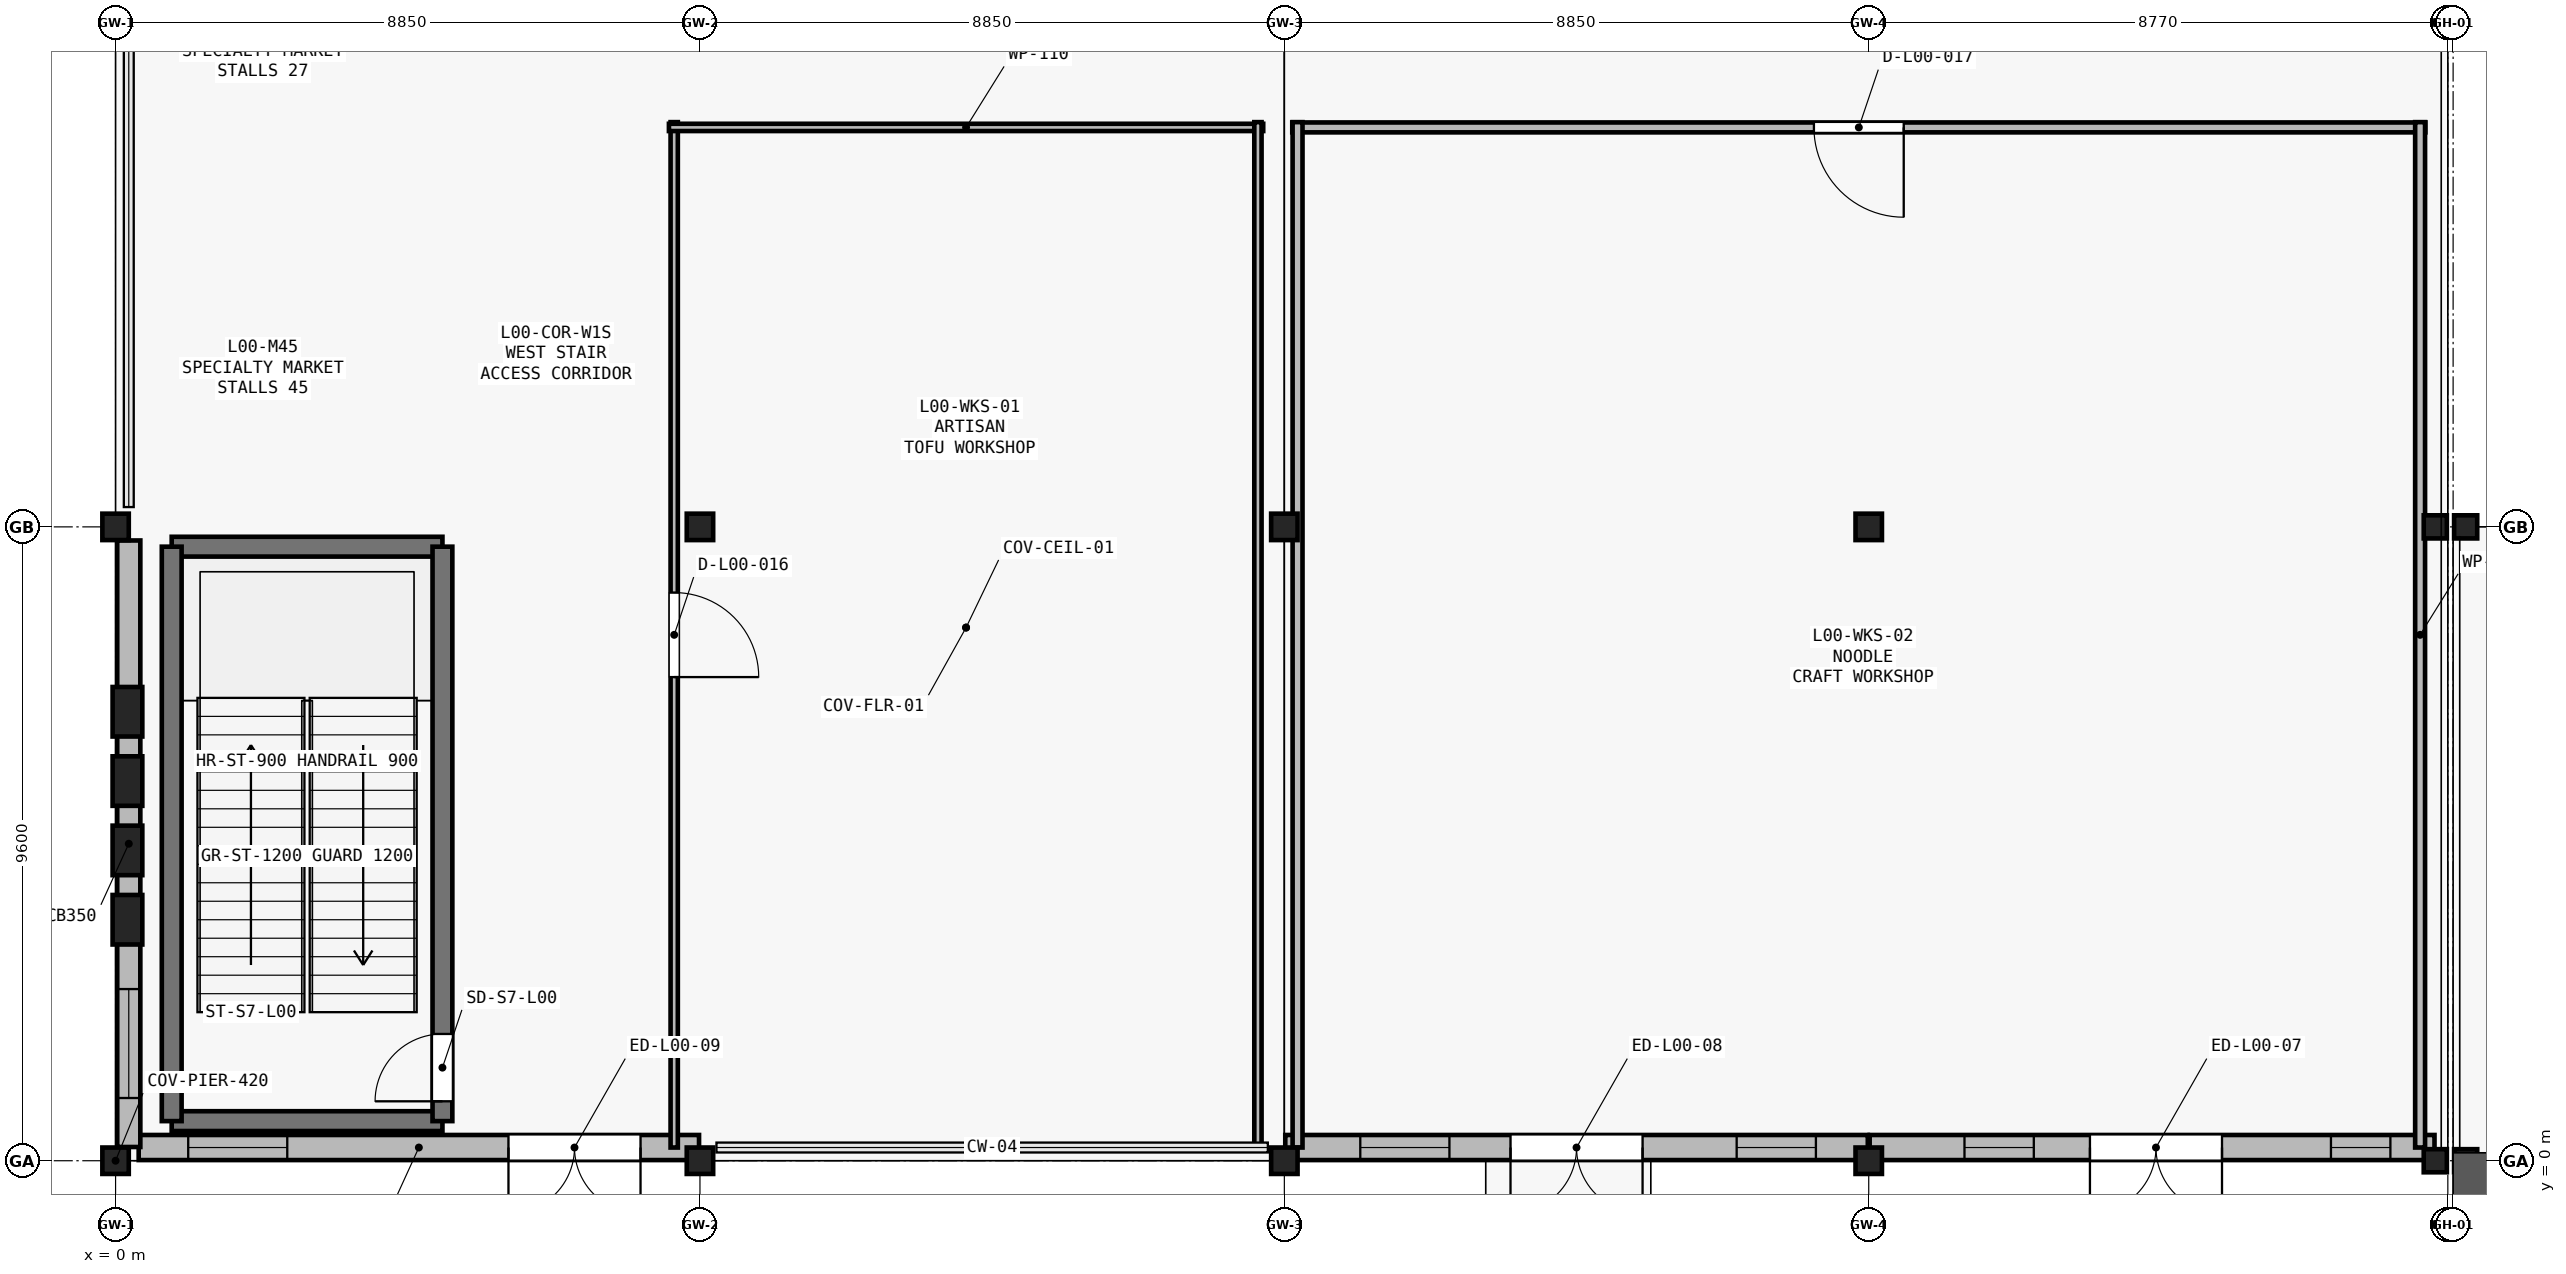
"""IFC4 building model, lengths in metres.
Left out: names, types, materials, properties, quantities, classifications, styles, units other than length and angle.
Written with IfcOpenShell. Run it as: python <this file> out.ifc"""

import sys

from ifc_helpers import new_model, si_unit, direction, frame, frame_2d, origin, origin_2d, place, context, subcontext, project, spatial, rectangle, i_section, extrude, element, fill, save


model = new_model("IFC4")
c1 = context("Model", 3, precision=1e-05, world=origin(), true_north=direction((0.0, 1.0)))
c2 = subcontext(c1, "Body", "Model", "MODEL_VIEW")
j1 = project(units=[si_unit("LENGTHUNIT", "METRE"), si_unit("PLANEANGLEUNIT", "RADIAN")], contexts=[c1])
p1 = place(None, origin())
s1 = spatial("IfcSite", under=j1, at=p1, CompositionType="ELEMENT")
p2 = place(p1, origin())
s2 = spatial("IfcBuilding", under=s1, at=p2, CompositionType="ELEMENT")
p3 = place(p2, origin())
s3 = spatial("IfcBuildingStorey", under=s2, at=p3, CompositionType="ELEMENT", Elevation=0.0)
for number, where, z_axis, x_axis in (
    (1, (0.0, 0.0, 0.0), (0.0, 0.0, 1.0), (1.0, 0.0, 0.0)),
    (2, (0.0, 9.6, 0.0), (0.0, 0.0, 1.0), (1.0, 0.0, 0.0)),
    (3, (8.85, 0.0, 0.0), (0.0, 0.0, 1.0), (1.0, 0.0, 0.0)),
    (4, (8.85, 9.6, 0.0), (0.0, 0.0, 1.0), (1.0, 0.0, 0.0)),
    (5, (17.7, 0.0, 0.0), (0.0, 0.0, 1.0), (1.0, 0.0, 0.0)),
    (6, (17.7, 9.6, 0.0), (0.0, 0.0, 1.0), (1.0, 0.0, 0.0)),
    (7, (26.55, 0.0, 0.0), (0.0, 0.0, 1.0), (1.0, 0.0, 0.0)),
    (8, (26.55, 9.6, 0.0), (0.0, 0.0, 1.0), (1.0, 0.0, 0.0)),
):
    element("IfcColumn", number, at=place(p3, frame(where, z_axis=z_axis, x_axis=x_axis)), inside=s3, PredefinedType="COLUMN", context=c2, shape_type="SweptSolid", body=[
        extrude(i_section(OverallWidth=0.4, OverallDepth=0.4, WebThickness=0.013, FlangeThickness=0.021, FilletRadius=0.022, at=origin_2d()), origin(), (0.0, 0.0, 1.0), 6.0),
    ])
for number, where, z_axis, x_axis in (
    (9, (35.13, 0.0, 0.0), (0.0, 0.0, 1.0), (1.0, 0.0, 0.0)),
    (10, (35.13, 9.6, 0.0), (0.0, 0.0, 1.0), (1.0, 0.0, 0.0)),
    (11, (35.59, 0.0, 0.0), (0.0, 0.0, 1.0), (1.0, 0.0, 0.0)),
    (12, (35.59, 9.6, 0.0), (0.0, 0.0, 1.0), (1.0, 0.0, 0.0)),
):
    element("IfcColumn", number, at=place(p3, frame(where, z_axis=z_axis, x_axis=x_axis)), inside=s3, PredefinedType="COLUMN", context=c2, shape_type="SweptSolid", body=[
        extrude(i_section(OverallWidth=0.35, OverallDepth=0.35, WebThickness=0.012, FlangeThickness=0.019, FilletRadius=0.02, at=origin_2d()), origin(), (0.0, 0.0, 1.0), 6.0),
    ])
for number, where, z_axis, x_axis in (
    (13, (0.18, 3.65, 0.0), (0.0, 0.0, 1.0), (1.0, 0.0, 0.0)),
    (14, (0.18, 4.7, 0.0), (0.0, 0.0, 1.0), (1.0, 0.0, 0.0)),
    (15, (0.18, 5.75, 0.0), (0.0, 0.0, 1.0), (1.0, 0.0, 0.0)),
    (16, (0.18, 6.8, 0.0), (0.0, 0.0, 1.0), (1.0, 0.0, 0.0)),
):
    element("IfcColumn", number, at=place(p3, frame(where, z_axis=z_axis, x_axis=x_axis)), inside=s3, PredefinedType="PILASTER", context=c2, shape_type="SweptSolid", body=[
        extrude(rectangle(XDim=0.45, YDim=0.75, at=origin_2d()), origin(), (0.0, 0.0, 1.0), 5.75),
    ])
p4 = place(p3, frame((35.118, 0.2, 0.0), z_axis=(0.0, 0.0, 1.0), x_axis=(-1.0, 0.0, 0.0)))
e17 = element("IfcWall", 17, at=p4, inside=s3, PredefinedType="SOLIDWALL", context=c2, shape_type="SweptSolid", body=[
    extrude(rectangle(XDim=8.554, YDim=0.38, at=frame_2d((4.277, 0.0))), origin(), (0.0, 0.0, 1.0), 5.12),
])
p5 = place(p4, frame((3.218, 0.0, 0.0)))
e18 = element("IfcOpeningElement", 18, at=p5, cuts=e17, PredefinedType="OPENING", context=c2, shape_type="SweptSolid", body=[
    extrude(rectangle(XDim=2.0, YDim=2.2, at=frame_2d((1.0, 1.1))), frame((0.0, 0.2, 0.0), z_axis=(0.0, -1.0, 0.0), x_axis=(1.0, 0.0, 0.0)), (0.0, 0.0, 1.0), 0.4),
])
p6 = place(p4, frame((0.668, 0.0, 1.0)))
e19 = element("IfcOpeningElement", 19, at=p6, cuts=e17, PredefinedType="OPENING", context=c2, shape_type="SweptSolid", body=[
    extrude(rectangle(XDim=0.9, YDim=1.8, at=frame_2d((0.45, 0.9))), frame((0.0, 0.2, 0.0), z_axis=(0.0, -1.0, 0.0), x_axis=(1.0, 0.0, 0.0)), (0.0, 0.0, 1.0), 0.4),
])
p7 = place(p4, frame((6.068, 0.0, 1.0)))
e20 = element("IfcOpeningElement", 20, at=p7, cuts=e17, PredefinedType="OPENING", context=c2, shape_type="SweptSolid", body=[
    extrude(rectangle(XDim=1.05, YDim=1.8, at=frame_2d((0.525, 0.9))), frame((0.0, 0.2, 0.0), z_axis=(0.0, -1.0, 0.0), x_axis=(1.0, 0.0, 0.0)), (0.0, 0.0, 1.0), 0.4),
])
p8 = place(p3, frame((26.536, 0.2, 0.0), z_axis=(0.0, 0.0, 1.0), x_axis=(-1.0, 0.0, 0.0)))
e21 = element("IfcWall", 21, at=p8, inside=s3, PredefinedType="SOLIDWALL", context=c2, shape_type="SweptSolid", body=[
    extrude(rectangle(XDim=8.822, YDim=0.38, at=frame_2d((4.411, 0.0))), origin(), (0.0, 0.0, 1.0), 5.12),
])
p9 = place(p8, frame((3.411, 0.0, 0.0)))
e22 = element("IfcOpeningElement", 22, at=p9, cuts=e21, PredefinedType="OPENING", context=c2, shape_type="SweptSolid", body=[
    extrude(rectangle(XDim=2.0, YDim=2.2, at=frame_2d((1.0, 1.1))), frame((0.0, 0.2, 0.0), z_axis=(0.0, -1.0, 0.0), x_axis=(1.0, 0.0, 0.0)), (0.0, 0.0, 1.0), 0.4),
])
p10 = place(p8, frame((0.786, 0.0, 1.0)))
e23 = element("IfcOpeningElement", 23, at=p10, cuts=e21, PredefinedType="OPENING", context=c2, shape_type="SweptSolid", body=[
    extrude(rectangle(XDim=1.2, YDim=1.8, at=frame_2d((0.6, 0.9))), frame((0.0, 0.2, 0.0), z_axis=(0.0, -1.0, 0.0), x_axis=(1.0, 0.0, 0.0)), (0.0, 0.0, 1.0), 0.4),
])
p11 = place(p8, frame((6.336, 0.0, 1.0)))
e24 = element("IfcOpeningElement", 24, at=p11, cuts=e21, PredefinedType="OPENING", context=c2, shape_type="SweptSolid", body=[
    extrude(rectangle(XDim=1.35, YDim=1.8, at=frame_2d((0.675, 0.9))), frame((0.0, 0.2, 0.0), z_axis=(0.0, -1.0, 0.0), x_axis=(1.0, 0.0, 0.0)), (0.0, 0.0, 1.0), 0.4),
])
p12 = place(p3, frame((8.836, 0.2, 0.0), z_axis=(0.0, 0.0, 1.0), x_axis=(-1.0, 0.0, 0.0)))
e25 = element("IfcWall", 25, at=p12, inside=s3, PredefinedType="SOLIDWALL", context=c2, shape_type="SweptSolid", body=[
    extrude(rectangle(XDim=8.486, YDim=0.38, at=frame_2d((4.243, 0.0))), origin(), (0.0, 0.0, 1.0), 5.12),
])
p13 = place(p12, frame((0.886, 0.0, 0.0)))
e26 = element("IfcOpeningElement", 26, at=p13, cuts=e25, PredefinedType="OPENING", context=c2, shape_type="SweptSolid", body=[
    extrude(rectangle(XDim=2.0, YDim=2.2, at=frame_2d((1.0, 1.1))), frame((0.0, 0.2, 0.0), z_axis=(0.0, -1.0, 0.0), x_axis=(1.0, 0.0, 0.0)), (0.0, 0.0, 1.0), 0.4),
])
p14 = place(p12, frame((6.236, 0.0, 1.0)))
e27 = element("IfcOpeningElement", 27, at=p14, cuts=e25, PredefinedType="OPENING", context=c2, shape_type="SweptSolid", body=[
    extrude(rectangle(XDim=1.5, YDim=1.8, at=frame_2d((0.75, 0.9))), frame((0.0, 0.2, 0.0), z_axis=(0.0, -1.0, 0.0), x_axis=(1.0, 0.0, 0.0)), (0.0, 0.0, 1.0), 0.4),
])
p15 = place(p3, frame((0.2, 0.208, 0.0), z_axis=(0.0, 0.0, 1.0), x_axis=(0.0, 1.0, 0.0)))
e28 = element("IfcWall", 28, at=p15, inside=s3, PredefinedType="SOLIDWALL", context=c2, shape_type="SweptSolid", body=[
    extrude(rectangle(XDim=9.186, YDim=0.35, at=frame_2d((4.593, 0.0))), origin(), (0.0, 0.0, 1.0), 5.12),
])
p16 = place(p15, frame((0.742, 0.0, 1.05)))
e29 = element("IfcOpeningElement", 29, at=p16, cuts=e28, PredefinedType="OPENING", context=c2, shape_type="SweptSolid", body=[
    extrude(rectangle(XDim=1.65, YDim=1.8, at=frame_2d((0.825, 0.9))), frame((0.0, 0.185, 0.0), z_axis=(0.0, -1.0, 0.0), x_axis=(1.0, 0.0, 0.0)), (0.0, 0.0, 1.0), 0.37),
])
for number, where, z_axis, x_axis in (
    (30, (0.85, 0.6, 0.0), (0.0, 0.0, 1.0), (1.0, 0.0, 0.0)),
    (31, (4.95, 9.3, 0.0), (0.0, 0.0, 1.0), (-1.0, 0.0, 0.0)),
):
    element("IfcWall", number, at=place(p3, frame(where, z_axis=z_axis, x_axis=x_axis)), inside=s3, PredefinedType="SHEAR", context=c2, shape_type="SweptSolid", body=[
        extrude(rectangle(XDim=4.1, YDim=0.3, at=frame_2d((2.05, 0.0))), origin(), (0.0, 0.0, 1.0), 6.0),
    ])
p17 = place(p3, frame((0.85, 9.3, 0.0), z_axis=(0.0, 0.0, 1.0), x_axis=(0.0, -1.0, 0.0)))
e32 = element("IfcWall", 32, at=p17, inside=s3, PredefinedType="SHEAR", context=c2, shape_type="SweptSolid", body=[
    extrude(rectangle(XDim=8.7, YDim=0.3, at=frame_2d((4.35, 0.0))), origin(), (0.0, 0.0, 1.0), 6.0),
])
p18 = place(p3, frame((4.95, 0.6, 0.0), z_axis=(0.0, 0.0, 1.0), x_axis=(0.0, 1.0, 0.0)))
e33 = element("IfcWall", 33, at=p18, inside=s3, PredefinedType="SHEAR", context=c2, shape_type="SweptSolid", body=[
    extrude(rectangle(XDim=8.7, YDim=0.3, at=frame_2d((4.35, 0.0))), origin(), (0.0, 0.0, 1.0), 6.0),
])
p19 = place(p18, frame((0.3, 0.0, 0.0)))
e34 = element("IfcOpeningElement", 34, at=p19, cuts=e33, PredefinedType="OPENING", context=c2, shape_type="SweptSolid", body=[
    extrude(rectangle(XDim=1.02, YDim=2.1, at=frame_2d((0.51, 1.05))), frame((0.0, 0.16, 0.0), z_axis=(0.0, -1.0, 0.0), x_axis=(1.0, 0.0, 0.0)), (0.0, 0.0, 1.0), 0.32),
])
p20 = place(p3, frame((8.46, 15.73, 0.0), z_axis=(0.0, 0.0, 1.0), x_axis=(0.0, -1.0, 0.0)))
e35 = element("IfcWall", 35, at=p20, inside=s3, PredefinedType="PARTITIONING", context=c2, shape_type="SweptSolid", body=[
    extrude(rectangle(XDim=15.53, YDim=0.11, at=frame_2d((7.765, 0.0))), origin(), (0.0, 0.0, 1.0), 5.52),
])
p21 = place(p20, frame((7.125, 0.0, 0.0)))
e36 = element("IfcOpeningElement", 36, at=p21, cuts=e35, PredefinedType="OPENING", context=c2, shape_type="SweptSolid", body=[
    extrude(rectangle(XDim=1.28, YDim=2.15, at=frame_2d((0.64, 1.075))), frame((0.0, 0.065, 0.0), z_axis=(0.0, -1.0, 0.0), x_axis=(1.0, 0.0, 0.0)), (0.0, 0.0, 1.0), 0.13),
])
p22 = place(p3, frame((17.38, 15.65, 0.0), z_axis=(0.0, 0.0, 1.0), x_axis=(-1.0, 0.0, 0.0)))
e37 = element("IfcWall", 37, at=p22, inside=s3, PredefinedType="PARTITIONING", context=c2, shape_type="SweptSolid", body=[
    extrude(rectangle(XDim=9.0, YDim=0.11, at=frame_2d((4.5, 0.0))), origin(), (0.0, 0.0, 1.0), 5.52),
])
p23 = place(p3, frame((17.3, 0.2, 0.0), z_axis=(0.0, 0.0, 1.0), x_axis=(0.0, 1.0, 0.0)))
e38 = element("IfcWall", 38, at=p23, inside=s3, PredefinedType="PARTITIONING", context=c2, shape_type="SweptSolid", body=[
    extrude(rectangle(XDim=15.53, YDim=0.11, at=frame_2d((7.765, 0.0))), origin(), (0.0, 0.0, 1.0), 5.52),
])
p24 = place(p3, frame((34.98, 15.65, 0.0), z_axis=(0.0, 0.0, 1.0), x_axis=(-1.0, 0.0, 0.0)))
e39 = element("IfcWall", 39, at=p24, inside=s3, PredefinedType="PARTITIONING", context=c2, shape_type="SweptSolid", body=[
    extrude(rectangle(XDim=17.16, YDim=0.15, at=frame_2d((8.58, 0.0))), origin(), (0.0, 0.0, 1.0), 5.52),
])
p25 = place(p24, frame((7.9, 0.0, 0.0)))
e40 = element("IfcOpeningElement", 40, at=p25, cuts=e39, PredefinedType="OPENING", context=c2, shape_type="SweptSolid", body=[
    extrude(rectangle(XDim=1.36, YDim=2.15, at=frame_2d((0.68, 1.075))), frame((0.0, 0.085, 0.0), z_axis=(0.0, -1.0, 0.0), x_axis=(1.0, 0.0, 0.0)), (0.0, 0.0, 1.0), 0.17),
])
p26 = place(p3, frame((34.9, 0.2, 0.0), z_axis=(0.0, 0.0, 1.0), x_axis=(0.0, 1.0, 0.0)))
e41 = element("IfcWall", 41, at=p26, inside=s3, PredefinedType="PARTITIONING", context=c2, shape_type="SweptSolid", body=[
    extrude(rectangle(XDim=15.53, YDim=0.15, at=frame_2d((7.765, 0.0))), origin(), (0.0, 0.0, 1.0), 5.2),
])
p27 = place(p3, frame((17.9, 15.73, 0.0), z_axis=(0.0, 0.0, 1.0), x_axis=(0.0, -1.0, 0.0)))
e42 = element("IfcWall", 42, at=p27, inside=s3, PredefinedType="PARTITIONING", context=c2, shape_type="SweptSolid", body=[
    extrude(rectangle(XDim=15.53, YDim=0.15, at=frame_2d((7.765, 0.0))), origin(), (0.0, 0.0, 1.0), 5.215),
])
p28 = place(p5, origin())
e43 = element("IfcDoor", 43, at=p28, inside=s3, OperationType="DOUBLE_DOOR_SINGLE_SWING", PredefinedType="DOOR", context=c2, shape_type="SweptSolid", body=[
    extrude(rectangle(XDim=2.0, YDim=2.2, at=frame_2d((1.0, 1.1))), frame((0.0, 0.025, 0.0), z_axis=(0.0, -1.0, 0.0), x_axis=(1.0, 0.0, 0.0)), (0.0, 0.0, 1.0), 0.05),
])
fill(e18, e43)
p29 = place(p6, origin())
e44 = element("IfcWindow", 44, at=p29, inside=s3, PartitioningType="SINGLE_PANEL", PredefinedType="WINDOW", context=c2, shape_type="SweptSolid", body=[
    extrude(rectangle(XDim=0.9, YDim=1.8, at=frame_2d((0.45, 0.9))), frame((0.0, 0.03, 0.0), z_axis=(0.0, -1.0, 0.0), x_axis=(1.0, 0.0, 0.0)), (0.0, 0.0, 1.0), 0.06),
])
fill(e19, e44)
p30 = place(p7, origin())
e45 = element("IfcWindow", 45, at=p30, inside=s3, PartitioningType="SINGLE_PANEL", PredefinedType="WINDOW", context=c2, shape_type="SweptSolid", body=[
    extrude(rectangle(XDim=1.05, YDim=1.8, at=frame_2d((0.525, 0.9))), frame((0.0, 0.03, 0.0), z_axis=(0.0, -1.0, 0.0), x_axis=(1.0, 0.0, 0.0)), (0.0, 0.0, 1.0), 0.06),
])
fill(e20, e45)
p31 = place(p9, origin())
e46 = element("IfcDoor", 46, at=p31, inside=s3, OperationType="DOUBLE_DOOR_SINGLE_SWING", PredefinedType="DOOR", context=c2, shape_type="SweptSolid", body=[
    extrude(rectangle(XDim=2.0, YDim=2.2, at=frame_2d((1.0, 1.1))), frame((0.0, 0.025, 0.0), z_axis=(0.0, -1.0, 0.0), x_axis=(1.0, 0.0, 0.0)), (0.0, 0.0, 1.0), 0.05),
])
fill(e22, e46)
p32 = place(p10, origin())
e47 = element("IfcWindow", 47, at=p32, inside=s3, PartitioningType="SINGLE_PANEL", PredefinedType="WINDOW", context=c2, shape_type="SweptSolid", body=[
    extrude(rectangle(XDim=1.2, YDim=1.8, at=frame_2d((0.6, 0.9))), frame((0.0, 0.03, 0.0), z_axis=(0.0, -1.0, 0.0), x_axis=(1.0, 0.0, 0.0)), (0.0, 0.0, 1.0), 0.06),
])
fill(e23, e47)
p33 = place(p11, origin())
e48 = element("IfcWindow", 48, at=p33, inside=s3, PartitioningType="SINGLE_PANEL", PredefinedType="WINDOW", context=c2, shape_type="SweptSolid", body=[
    extrude(rectangle(XDim=1.35, YDim=1.8, at=frame_2d((0.675, 0.9))), frame((0.0, 0.03, 0.0), z_axis=(0.0, -1.0, 0.0), x_axis=(1.0, 0.0, 0.0)), (0.0, 0.0, 1.0), 0.06),
])
fill(e24, e48)
p34 = place(p13, origin())
e49 = element("IfcDoor", 49, at=p34, inside=s3, OperationType="DOUBLE_DOOR_SINGLE_SWING", PredefinedType="DOOR", context=c2, shape_type="SweptSolid", body=[
    extrude(rectangle(XDim=2.0, YDim=2.2, at=frame_2d((1.0, 1.1))), frame((0.0, 0.025, 0.0), z_axis=(0.0, -1.0, 0.0), x_axis=(1.0, 0.0, 0.0)), (0.0, 0.0, 1.0), 0.05),
])
fill(e26, e49)
p35 = place(p14, origin())
e50 = element("IfcWindow", 50, at=p35, inside=s3, PartitioningType="SINGLE_PANEL", PredefinedType="WINDOW", context=c2, shape_type="SweptSolid", body=[
    extrude(rectangle(XDim=1.5, YDim=1.8, at=frame_2d((0.75, 0.9))), frame((0.0, 0.03, 0.0), z_axis=(0.0, -1.0, 0.0), x_axis=(1.0, 0.0, 0.0)), (0.0, 0.0, 1.0), 0.06),
])
fill(e27, e50)
p36 = place(p16, origin())
e51 = element("IfcWindow", 51, at=p36, inside=s3, PartitioningType="SINGLE_PANEL", PredefinedType="WINDOW", context=c2, shape_type="SweptSolid", body=[
    extrude(rectangle(XDim=1.65, YDim=1.8, at=frame_2d((0.825, 0.9))), frame((0.0, 0.03, 0.0), z_axis=(0.0, -1.0, 0.0), x_axis=(1.0, 0.0, 0.0)), (0.0, 0.0, 1.0), 0.06),
])
fill(e29, e51)
p37 = place(p19, origin())
e52 = element("IfcDoor", 52, at=p37, inside=s3, OperationType="SINGLE_SWING_LEFT", PredefinedType="DOOR", context=c2, shape_type="SweptSolid", body=[
    extrude(rectangle(XDim=1.02, YDim=2.1, at=frame_2d((0.51, 1.05))), frame((0.0, 0.025, 0.0), z_axis=(0.0, -1.0, 0.0), x_axis=(1.0, 0.0, 0.0)), (0.0, 0.0, 1.0), 0.05),
])
fill(e34, e52)
p38 = place(p21, origin())
e53 = element("IfcDoor", 53, at=p38, inside=s3, OperationType="SINGLE_SWING_RIGHT", PredefinedType="DOOR", context=c2, shape_type="SweptSolid", body=[
    extrude(rectangle(XDim=1.28, YDim=2.15, at=frame_2d((0.64, 1.075))), frame((0.0, 0.025, 0.0), z_axis=(0.0, -1.0, 0.0), x_axis=(1.0, 0.0, 0.0)), (0.0, 0.0, 1.0), 0.05),
])
fill(e36, e53)
p39 = place(p25, origin())
e54 = element("IfcDoor", 54, at=p39, inside=s3, OperationType="SINGLE_SWING_LEFT", PredefinedType="DOOR", context=c2, shape_type="SweptSolid", body=[
    extrude(rectangle(XDim=1.36, YDim=2.15, at=frame_2d((0.68, 1.075))), frame((0.0, 0.025, 0.0), z_axis=(0.0, -1.0, 0.0), x_axis=(1.0, 0.0, 0.0)), (0.0, 0.0, 1.0), 0.05),
])
fill(e40, e54)
save(model, sys.argv[1])
